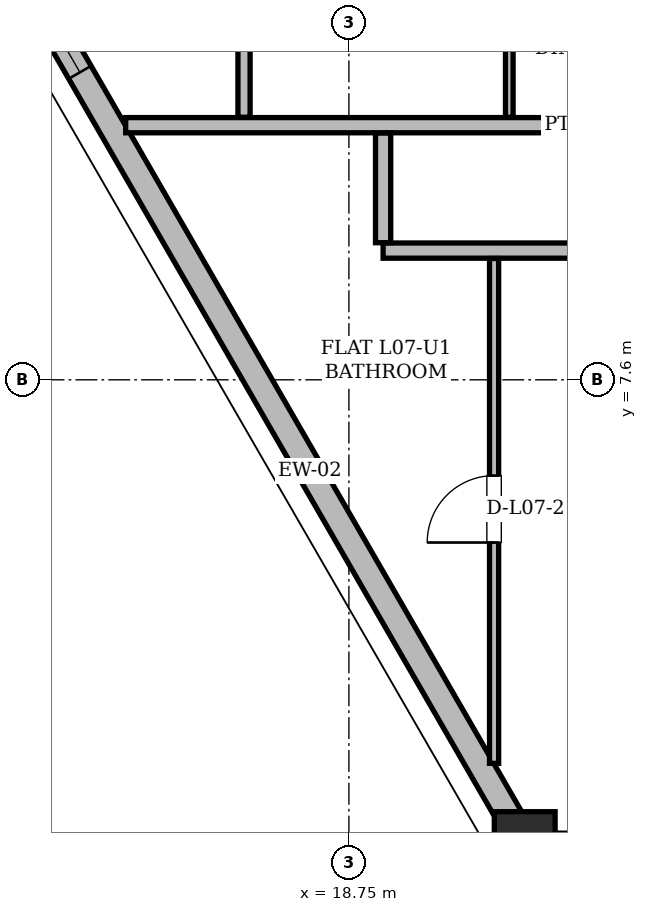
"""IFC4 building model, lengths in metres.
Left out: names, types, materials, properties, quantities, classifications, styles, units other than length and angle.
Written with IfcOpenShell. Run it as: python <this file> out.ifc"""

import sys

from ifc_helpers import new_model, si_unit, direction, frame, frame_2d, origin, origin_2d, place, context, subcontext, project, spatial, rectangle, hollow_rectangle, extrude, element, fill, save


model = new_model("IFC4")
c1 = context("Model", 3, precision=1e-05, world=origin(), true_north=direction((0.0, 1.0)))
c2 = subcontext(c1, "Body", "Model", "MODEL_VIEW")
j1 = project(units=[si_unit("LENGTHUNIT", "METRE"), si_unit("PLANEANGLEUNIT", "RADIAN")], contexts=[c1])
p1 = place(None, origin())
s1 = spatial("IfcSite", under=j1, at=p1, CompositionType="ELEMENT")
p2 = place(p1, origin())
s2 = spatial("IfcBuilding", under=s1, at=p2, CompositionType="ELEMENT")
p3 = place(p2, frame((0.0, 0.0, 30.9)))
s3 = spatial("IfcBuildingStorey", under=s2, at=p3, CompositionType="ELEMENT", Elevation=30.9)
p4 = place(p3, frame((21.088, 1.466, 0.005), z_axis=(-0.013793922819, 0.029082753529, 0.999481826318), x_axis=(-0.903522800659, -0.428540019939, 0.0)))
e1 = element("IfcColumn", 1, at=p4, inside=s3, PredefinedType="COLUMN", context=c2, shape_type="SweptSolid", body=[
    extrude(hollow_rectangle(XDim=0.8, YDim=0.8, WallThickness=0.065, at=origin_2d()), origin(), (0.0, 0.0, 1.0), 3.593),
])
p5 = place(p3, frame((13.156, 15.204, 0.0), z_axis=(0.0, 0.0, 1.0), x_axis=(0.500005775488, -0.866022069279, 0.0)))
e2 = element("IfcWall", 2, at=p5, inside=s3, PredefinedType="SOLIDWALL", context=c2, shape_type="SweptSolid", body=[
    extrude(rectangle(XDim=15.863, YDim=0.34, at=frame_2d((7.932, 0.0))), origin(), (0.0, 0.0, 1.0), 2.494),
])
p6 = place(p5, frame((2.909, 0.0, 0.85)))
e3 = element("IfcOpeningElement", 3, at=p6, cuts=e2, PredefinedType="OPENING", context=c2, shape_type="SweptSolid", body=[
    extrude(rectangle(XDim=1.2, YDim=1.48, at=frame_2d((0.6, 0.74))), frame((0.0, 0.17, 0.0), z_axis=(0.0, -1.0, 0.0), x_axis=(1.0, 0.0, 0.0)), (0.0, 0.0, 1.0), 0.34),
])
p7 = place(p3, frame((19.2, 9.3, 0.0), z_axis=(0.0, 0.0, 1.0), x_axis=(1.0, 0.0, 0.0)))
e4 = element("IfcWall", 4, at=p7, inside=s3, PredefinedType="PARTITIONING", context=c2, shape_type="SweptSolid", body=[
    extrude(rectangle(XDim=36.6, YDim=0.2, at=frame_2d((18.3, 0.0))), origin(), (0.0, 0.0, 1.0), 2.738),
])
p8 = place(p7, frame((6.634, 0.0, 0.0)))
e5 = element("IfcOpeningElement", 5, at=p8, cuts=e4, PredefinedType="OPENING", context=c2, shape_type="SweptSolid", body=[
    extrude(rectangle(XDim=1.0, YDim=2.18, at=frame_2d((0.5, 1.09))), frame((0.0, 0.1, 0.0), z_axis=(0.0, -1.0, 0.0), x_axis=(1.0, 0.0, 0.0)), (0.0, 0.0, 1.0), 0.2),
])
p9 = place(p7, frame((23.646, 0.0, 0.0)))
e6 = element("IfcOpeningElement", 6, at=p9, cuts=e4, PredefinedType="OPENING", context=c2, shape_type="SweptSolid", body=[
    extrude(rectangle(XDim=1.0, YDim=2.18, at=frame_2d((0.5, 1.09))), frame((0.0, 0.1, 0.0), z_axis=(0.0, -1.0, 0.0), x_axis=(1.0, 0.0, 0.0)), (0.0, 0.0, 1.0), 0.2),
])
p10 = place(p3, frame((15.813, 10.95, 0.0), z_axis=(0.0, 0.0, 1.0), x_axis=(1.0, 0.0, 0.0)))
e7 = element("IfcWall", 7, at=p10, inside=s3, PredefinedType="PARTITIONING", context=c2, shape_type="SweptSolid", body=[
    extrude(rectangle(XDim=11.737, YDim=0.2, at=frame_2d((5.869, 0.0))), origin(), (0.0, 0.0, 1.0), 3.36),
])
p11 = place(p3, frame((17.37, 11.054, 0.0), z_axis=(0.0, 0.0, 1.0), x_axis=(0.0, 1.0, 0.0)))
e8 = element("IfcWall", 8, at=p11, inside=s3, PredefinedType="PARTITIONING", context=c2, shape_type="SweptSolid", body=[
    extrude(rectangle(XDim=3.572, YDim=0.16, at=frame_2d((1.786, 0.0))), origin(), (0.0, 0.0, 1.0), 2.738),
])
p12 = place(p3, frame((19.2, 9.404, 0.0), z_axis=(0.0, 0.0, 1.0), x_axis=(0.0, 1.0, 0.0)))
e9 = element("IfcWall", 9, at=p12, inside=s3, PredefinedType="PARTITIONING", context=c2, shape_type="SweptSolid", body=[
    extrude(rectangle(XDim=1.442, YDim=0.2, at=frame_2d((0.721, 0.0))), origin(), (0.0, 0.0, 1.0), 3.36),
])
p13 = place(p3, frame((20.66, 2.554, 0.0), z_axis=(0.0, 0.0, 1.0), x_axis=(0.0, 1.0, 0.0)))
e10 = element("IfcWall", 10, at=p13, inside=s3, PredefinedType="PARTITIONING", context=c2, shape_type="SweptSolid", body=[
    extrude(rectangle(XDim=6.642, YDim=0.12, at=frame_2d((3.321, 0.0))), origin(), (0.0, 0.0, 1.0), 3.36),
])
p14 = place(p13, frame((2.905, 0.0, 0.0)))
e11 = element("IfcOpeningElement", 11, at=p14, cuts=e10, PredefinedType="OPENING", context=c2, shape_type="SweptSolid", body=[
    extrude(rectangle(XDim=0.88, YDim=2.08, at=frame_2d((0.44, 1.04))), frame((0.0, 0.06, 0.0), z_axis=(0.0, -1.0, 0.0), x_axis=(1.0, 0.0, 0.0)), (0.0, 0.0, 1.0), 0.12),
])
p15 = place(p3, frame((20.86, 11.054, 0.0), z_axis=(0.0, 0.0, 1.0), x_axis=(0.0, 1.0, 0.0)))
e12 = element("IfcWall", 12, at=p15, inside=s3, PredefinedType="PARTITIONING", context=c2, shape_type="SweptSolid", body=[
    extrude(rectangle(XDim=3.572, YDim=0.1, at=frame_2d((1.786, 0.0))), origin(), (0.0, 0.0, 1.0), 2.738),
])
p16 = place(p6, origin())
e13 = element("IfcWindow", 13, at=p16, inside=s3, PartitioningType="SINGLE_PANEL", PredefinedType="WINDOW", context=c2, shape_type="SweptSolid", body=[
    extrude(rectangle(XDim=1.2, YDim=1.48, at=frame_2d((0.6, 0.74))), frame((0.0, 0.03, 0.0), z_axis=(0.0, -1.0, 0.0), x_axis=(1.0, 0.0, 0.0)), (0.0, 0.0, 1.0), 0.06),
])
fill(e3, e13)
p17 = place(p14, origin())
e14 = element("IfcDoor", 14, at=p17, inside=s3, OperationType="SINGLE_SWING_LEFT", PredefinedType="DOOR", context=c2, shape_type="SweptSolid", body=[
    extrude(rectangle(XDim=0.88, YDim=2.08, at=frame_2d((0.44, 1.04))), frame((0.0, 0.025, 0.0), z_axis=(0.0, -1.0, 0.0), x_axis=(1.0, 0.0, 0.0)), (0.0, 0.0, 1.0), 0.05),
])
fill(e11, e14)
save(model, sys.argv[1])
